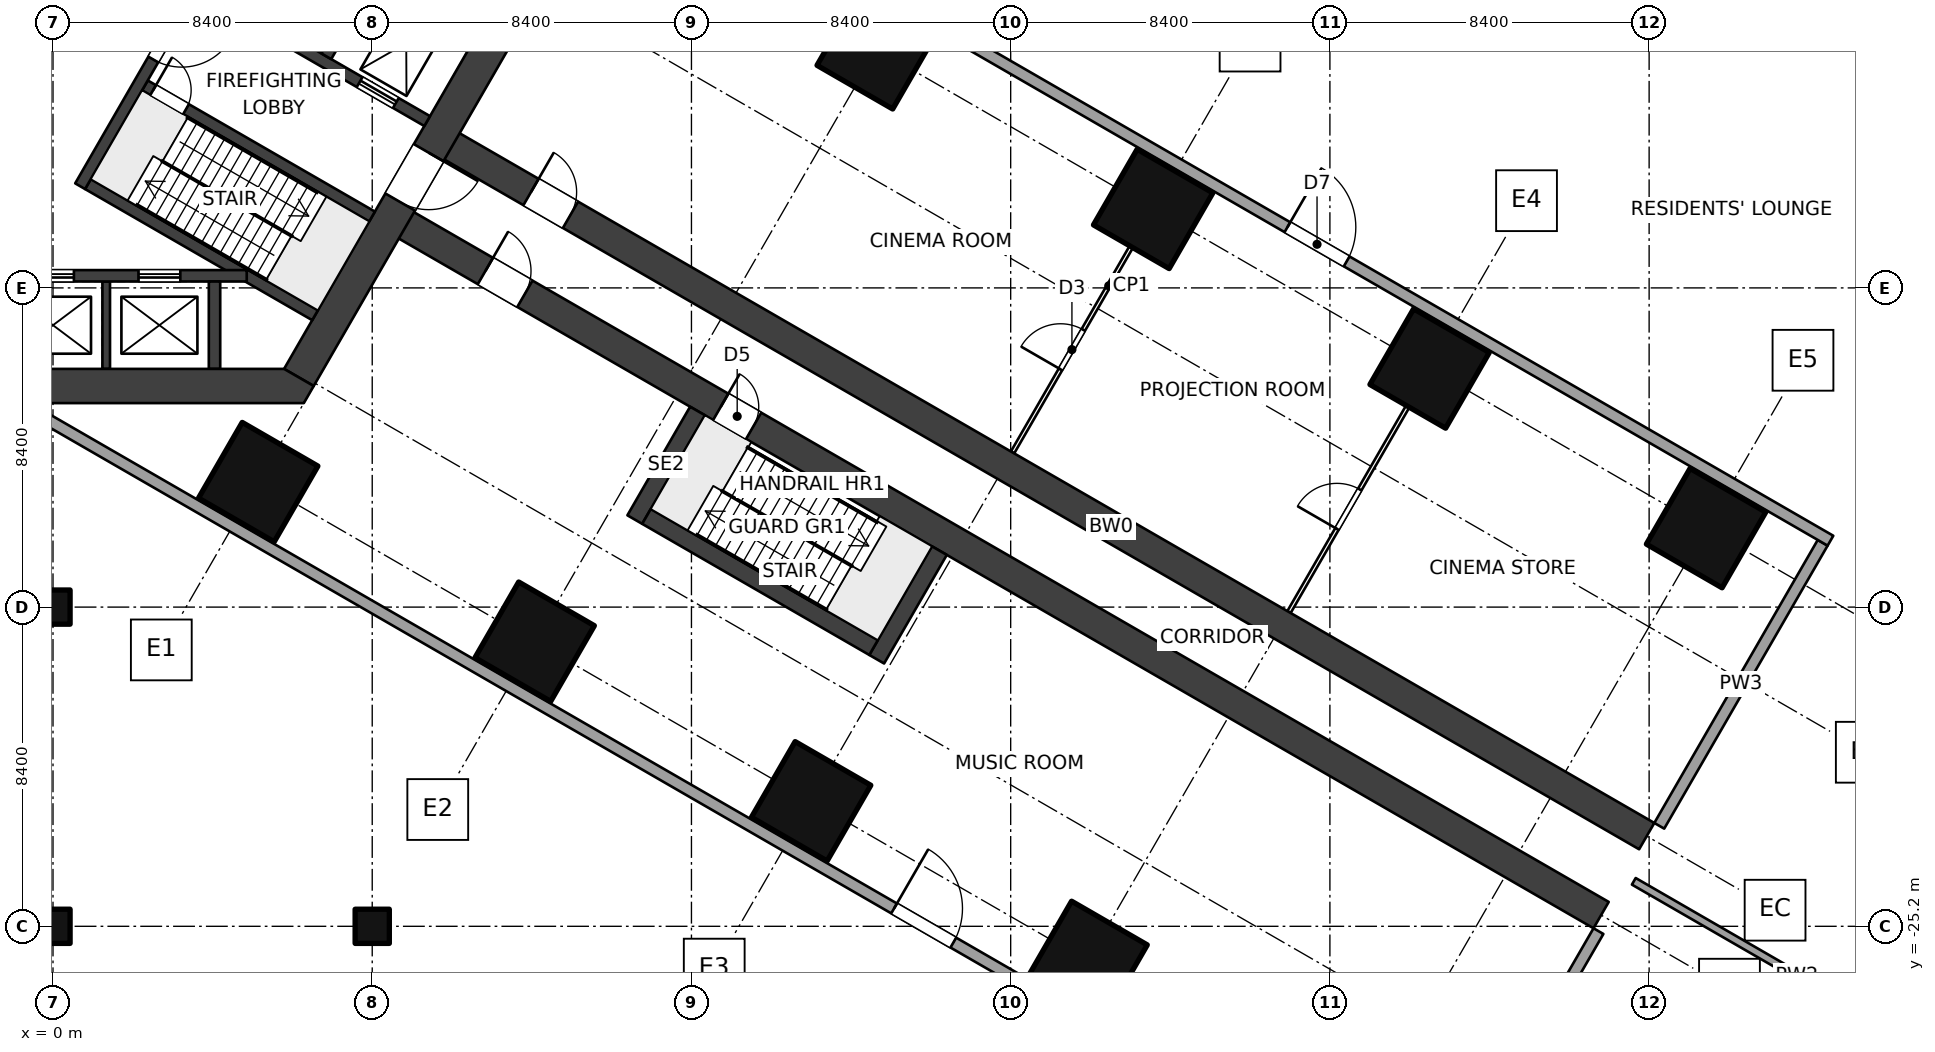
"""IFC4 building model, lengths in metres.
Left out: names, types, materials, properties, quantities, classifications, styles, units other than length and angle.
Written with IfcOpenShell. Run it as: python <this file> out.ifc"""

import sys

from ifc_helpers import new_model, si_unit, direction, frame, frame_2d, origin, origin_2d, place, context, subcontext, project, spatial, polyline, rectangle, outline, extrude, element, fill, save


model = new_model("IFC4")
c1 = context("Model", 3, precision=1e-05, world=origin(), true_north=direction((0.0, 1.0)))
c2 = subcontext(c1, "Body", "Model", "MODEL_VIEW")
j1 = project(units=[si_unit("LENGTHUNIT", "METRE"), si_unit("PLANEANGLEUNIT", "RADIAN")], contexts=[c1])
p1 = place(None, origin())
s1 = spatial("IfcSite", under=j1, at=p1, CompositionType="ELEMENT")
p2 = place(p1, origin())
s2 = spatial("IfcBuilding", under=s1, at=p2, CompositionType="ELEMENT")
p3 = place(p2, frame((0.0, 0.0, 6.0)))
s3 = spatial("IfcBuildingStorey", under=s2, at=p3, CompositionType="ELEMENT", Elevation=6.0)
for number, where, z_axis, x_axis in (
    (1, (5.4, -13.51, 0.0), (0.0, 0.0, 1.0), (-0.5, -0.866, 0.0)),
    (2, (21.675, -2.122, 0.0), (0.0, 0.0, 1.0), (-0.5, -0.866, 0.0)),
    (3, (12.675, -17.71, 0.0), (0.0, 0.0, 1.0), (-0.5, -0.866, 0.0)),
    (4, (28.949, -6.322, 0.0), (0.0, 0.0, 1.0), (-0.5, -0.866, 0.0)),
    (5, (19.949, -21.91, 0.0), (0.0, 0.0, 1.0), (-0.5, -0.866, 0.0)),
    (6, (36.224, -10.521, 0.0), (0.0, 0.0, 1.0), (-0.5, -0.866, 0.0)),
    (7, (27.224, -26.11, 0.0), (0.0, 0.0, 1.0), (-0.5, -0.866, 0.0)),
    (8, (43.499, -14.721, 0.0), (0.0, 0.0, 1.0), (-0.5, -0.866, 0.0)),
):
    element("IfcColumn", number, at=place(p3, frame(where, z_axis=z_axis, x_axis=x_axis)), inside=s3, PredefinedType="COLUMN", context=c2, shape_type="SweptSolid", body=[
        extrude(rectangle(XDim=2.3, YDim=2.3, at=origin_2d()), origin(), (0.0, 0.0, 1.0), 5.0),
    ])
for number, where, z_axis, x_axis in (
    (9, (0.0, -25.2, 0.0), (0.0, 0.0, 1.0), (1.0, 0.0, 0.0)),
    (10, (0.0, -16.8, 0.0), (0.0, 0.0, 1.0), (1.0, 0.0, 0.0)),
    (11, (8.4, -25.2, 0.0), (0.0, 0.0, 1.0), (1.0, 0.0, 0.0)),
):
    element("IfcColumn", number, at=place(p3, frame(where, z_axis=z_axis, x_axis=x_axis)), inside=s3, PredefinedType="COLUMN", context=c2, shape_type="SweptSolid", body=[
        extrude(rectangle(XDim=0.9, YDim=0.9, at=origin_2d()), origin(), (0.0, 0.0, 1.0), 5.0),
    ])
p4 = place(p3, frame((12.551, -0.225, 0.0), z_axis=(0.0, 0.0, 1.0), x_axis=(-0.499997612506, -0.8660267822, 0.0)))
e12 = element("IfcWall", 12, at=p4, inside=s3, PredefinedType="SHEAR", context=c2, shape_type="SweptSolid", body=[
    extrude(rectangle(XDim=12.161, YDim=0.9, at=frame_2d((6.08, 0.0))), origin(), (0.0, 0.0, 1.0), 5.0),
])
p5 = place(p4, frame((5.33, 0.0, 0.0)))
e13 = element("IfcOpeningElement", 13, at=p5, cuts=e12, PredefinedType="OPENING", context=c2, shape_type="SweptSolid", body=[
    extrude(rectangle(XDim=1.5, YDim=2.1, at=frame_2d((0.75, 1.05))), frame((0.0, 0.46, 0.0), z_axis=(0.0, -1.0, 0.0), x_axis=(1.0, 0.0, 0.0)), (0.0, 0.0, 1.0), 0.92),
])
p6 = place(p3, origin())
e14 = element("IfcWall", 14, at=p6, inside=s3, PredefinedType="SHEAR", context=c2, shape_type="SweptSolid", body=[
    extrude(outline(polyline([(-6.6, -11.432), (6.6, -11.432), (6.86, -10.981), (6.08, -10.531), (-6.08, -10.531), (-6.86, -10.981), (-6.6, -11.432)])), origin(), (0.0, 0.0, 1.0), 5.0),
])
p7 = place(p3, frame((5.314, 2.244, 0.0), z_axis=(0.0, 0.0, 1.0), x_axis=(-0.499995050369, -0.866028261437, 0.0)))
e15 = element("IfcWall", 15, at=p7, inside=s3, PredefinedType="SHEAR", context=c2, shape_type="SweptSolid", body=[
    extrude(rectangle(XDim=9.2, YDim=0.3, at=frame_2d((4.6, 0.0))), origin(), (0.0, 0.0, 1.0), 5.0),
])
p8 = place(p7, frame((3.85, 0.0, 0.0)))
e16 = element("IfcOpeningElement", 16, at=p8, cuts=e15, PredefinedType="OPENING", context=c2, shape_type="SweptSolid", body=[
    extrude(rectangle(XDim=1.5, YDim=2.1, at=frame_2d((0.75, 1.05))), frame((0.0, 0.16, 0.0), z_axis=(0.0, -1.0, 0.0), x_axis=(1.0, 0.0, 0.0)), (0.0, 0.0, 1.0), 0.32),
])
p9 = place(p7, frame((1.95, 0.0, 0.0)))
e17 = element("IfcOpeningElement", 17, at=p9, cuts=e15, PredefinedType="OPENING", context=c2, shape_type="SweptSolid", body=[
    extrude(rectangle(XDim=0.9, YDim=2.1, at=frame_2d((0.45, 1.05))), frame((0.0, 0.16, 0.0), z_axis=(0.0, -1.0, 0.0), x_axis=(1.0, 0.0, 0.0)), (0.0, 0.0, 1.0), 0.32),
])
p10 = place(p3, frame((2.419, -3.071, 0.0), z_axis=(0.0, 0.0, 1.0), x_axis=(0.86602711848, -0.499997030048, 0.0)))
e18 = element("IfcWall", 18, at=p10, inside=s3, PredefinedType="SHEAR", context=c2, shape_type="SweptSolid", body=[
    extrude(rectangle(XDim=6.901, YDim=0.3, at=frame_2d((3.451, 0.0))), origin(), (0.0, 0.0, 1.0), 5.0),
])
p11 = place(p10, frame((0.25, 0.0, 0.0)))
e19 = element("IfcOpeningElement", 19, at=p11, cuts=e18, PredefinedType="OPENING", context=c2, shape_type="SweptSolid", body=[
    extrude(rectangle(XDim=1.0, YDim=2.1, at=frame_2d((0.5, 1.05))), frame((0.0, 0.16, 0.0), z_axis=(0.0, -1.0, 0.0), x_axis=(1.0, 0.0, 0.0)), (0.0, 0.0, 1.0), 0.32),
])
p12 = place(p3, frame((0.919, -5.669, 0.0), z_axis=(0.0, 0.0, 1.0), x_axis=(0.866011800373, -0.500023561059, 0.0)))
e20 = element("IfcWall", 20, at=p12, inside=s3, PredefinedType="SHEAR", context=c2, shape_type="SweptSolid", body=[
    extrude(rectangle(XDim=6.902, YDim=0.3, at=frame_2d((3.451, 0.0))), origin(), (0.0, 0.0, 1.0), 5.0),
])
p13 = place(p3, frame((3.869, -0.559, 0.0), z_axis=(0.0, 0.0, 1.0), x_axis=(0.86602711848, -0.499997030048, 0.0)))
e21 = element("IfcWall", 21, at=p13, inside=s3, PredefinedType="SHEAR", context=c2, shape_type="SweptSolid", body=[
    extrude(rectangle(XDim=6.901, YDim=0.3, at=frame_2d((3.451, 0.0))), origin(), (0.0, 0.0, 1.0), 5.0),
])
p14 = place(p13, frame((4.85, 0.0, 0.0)))
e22 = element("IfcOpeningElement", 22, at=p14, cuts=e21, PredefinedType="OPENING", context=c2, shape_type="SweptSolid", body=[
    extrude(rectangle(XDim=1.1, YDim=2.1, at=frame_2d((0.55, 1.05))), frame((0.0, 0.16, 0.0), z_axis=(0.0, -1.0, 0.0), x_axis=(1.0, 0.0, 0.0)), (0.0, 0.0, 1.0), 0.32),
])
p15 = place(p3, frame((8.541, 0.034, 0.0), z_axis=(0.0, 0.0, 1.0), x_axis=(-0.50000943426, -0.866019956843, 0.0)))
e23 = element("IfcWall", 23, at=p15, inside=s3, PredefinedType="SHEAR", context=c2, shape_type="SweptSolid", body=[
    extrude(rectangle(XDim=2.7, YDim=0.3, at=frame_2d((1.35, 0.0))), origin(), (0.0, 0.0, 1.0), 5.0),
])
p16 = place(p3, frame((5.098, -8.082, 0.0), z_axis=(0.0, 0.0, 1.0), x_axis=(-1.0, 0.0, 0.0)))
e24 = element("IfcWall", 24, at=p16, inside=s3, PredefinedType="SHEAR", context=c2, shape_type="SweptSolid", body=[
    extrude(rectangle(XDim=10.195, YDim=0.3, at=frame_2d((5.098, 0.0))), origin(), (0.0, 0.0, 1.0), 5.0),
])
p17 = place(p16, frame((1.748, 0.0, 0.0)))
e25 = element("IfcOpeningElement", 25, at=p17, cuts=e24, PredefinedType="OPENING", context=c2, shape_type="SweptSolid", body=[
    extrude(rectangle(XDim=1.1, YDim=2.1, at=frame_2d((0.55, 1.05))), frame((0.0, 0.16, 0.0), z_axis=(0.0, -1.0, 0.0), x_axis=(1.0, 0.0, 0.0)), (0.0, 0.0, 1.0), 0.32),
])
p18 = place(p16, frame((4.548, 0.0, 0.0)))
e26 = element("IfcOpeningElement", 26, at=p18, cuts=e24, PredefinedType="OPENING", context=c2, shape_type="SweptSolid", body=[
    extrude(rectangle(XDim=1.1, YDim=2.1, at=frame_2d((0.55, 1.05))), frame((0.0, 0.16, 0.0), z_axis=(0.0, -1.0, 0.0), x_axis=(1.0, 0.0, 0.0)), (0.0, 0.0, 1.0), 0.32),
])
p19 = place(p16, frame((7.348, 0.0, 0.0)))
e27 = element("IfcOpeningElement", 27, at=p19, cuts=e24, PredefinedType="OPENING", context=c2, shape_type="SweptSolid", body=[
    extrude(rectangle(XDim=1.1, YDim=2.1, at=frame_2d((0.55, 1.05))), frame((0.0, 0.16, 0.0), z_axis=(0.0, -1.0, 0.0), x_axis=(1.0, 0.0, 0.0)), (0.0, 0.0, 1.0), 0.32),
])
p20 = place(p3, frame((4.25, -8.231, 0.0), z_axis=(0.0, 0.0, 1.0), x_axis=(0.0, -1.0, 0.0)))
e28 = element("IfcWall", 28, at=p20, inside=s3, PredefinedType="SHEAR", context=c2, shape_type="SweptSolid", body=[
    extrude(rectangle(XDim=2.3, YDim=0.3, at=frame_2d((1.15, 0.0))), origin(), (0.0, 0.0, 1.0), 5.0),
])
p21 = place(p3, frame((1.4, -8.231, 0.0), z_axis=(0.0, 0.0, 1.0), x_axis=(0.0, -1.0, 0.0)))
e29 = element("IfcWall", 29, at=p21, inside=s3, PredefinedType="SHEAR", context=c2, shape_type="SweptSolid", body=[
    extrude(rectangle(XDim=2.3, YDim=0.2, at=frame_2d((1.15, 0.0))), origin(), (0.0, 0.0, 1.0), 5.0),
])
p22 = place(p3, frame((10.11, -4.451, 0.0), z_axis=(0.0, 0.0, 1.0), x_axis=(0.866025284237, -0.500000207062, 0.0)))
e30 = element("IfcWall", 30, at=p22, inside=s3, PredefinedType="SHEAR", context=c2, shape_type="SweptSolid", body=[
    extrude(rectangle(XDim=36.75, YDim=0.8, at=frame_2d((18.375, 0.0))), origin(), (0.0, 0.0, 1.0), 5.0),
])
p23 = place(p22, frame((2.85, 0.0, 0.0)))
e31 = element("IfcOpeningElement", 31, at=p23, cuts=e30, PredefinedType="OPENING", context=c2, shape_type="SweptSolid", body=[
    extrude(rectangle(XDim=1.2, YDim=2.1, at=frame_2d((0.6, 1.05))), frame((0.0, 0.41, 0.0), z_axis=(0.0, -1.0, 0.0), x_axis=(1.0, 0.0, 0.0)), (0.0, 0.0, 1.0), 0.82),
])
p24 = place(p3, frame((8.91, -6.53, 0.0), z_axis=(0.0, 0.0, 1.0), x_axis=(0.866025284237, -0.500000207062, 0.0)))
e32 = element("IfcWall", 32, at=p24, inside=s3, PredefinedType="SHEAR", context=c2, shape_type="SweptSolid", body=[
    extrude(rectangle(XDim=36.75, YDim=0.8, at=frame_2d((18.375, 0.0))), origin(), (0.0, 0.0, 1.0), 5.0),
])
p25 = place(p24, frame((10.0, 0.0, 0.0)))
e33 = element("IfcOpeningElement", 33, at=p25, cuts=e32, PredefinedType="OPENING", context=c2, shape_type="SweptSolid", body=[
    extrude(rectangle(XDim=1.0, YDim=2.1, at=frame_2d((0.5, 1.05))), frame((0.0, 0.41, 0.0), z_axis=(0.0, -1.0, 0.0), x_axis=(1.0, 0.0, 0.0)), (0.0, 0.0, 1.0), 0.82),
])
p26 = place(p24, frame((2.85, 0.0, 0.0)))
e34 = element("IfcOpeningElement", 34, at=p26, cuts=e32, PredefinedType="OPENING", context=c2, shape_type="SweptSolid", body=[
    extrude(rectangle(XDim=1.2, YDim=2.1, at=frame_2d((0.6, 1.05))), frame((0.0, 0.41, 0.0), z_axis=(0.0, -1.0, 0.0), x_axis=(1.0, 0.0, 0.0)), (0.0, 0.0, 1.0), 0.82),
])
p27 = place(p3, frame((25.249, -12.73, 0.0), z_axis=(0.0, 0.0, 1.0), x_axis=(0.499987320047, 0.866032724435, 0.0)))
e35 = element("IfcWall", 35, at=p27, inside=s3, PredefinedType="PARTITIONING", context=c2, shape_type="SweptSolid", body=[
    extrude(rectangle(XDim=6.25, YDim=0.1, at=frame_2d((3.125, 0.0))), origin(), (0.0, 0.0, 1.0), 2.9),
])
p28 = place(p27, frame((2.525, 0.0, 0.0)))
e36 = element("IfcOpeningElement", 36, at=p28, cuts=e35, PredefinedType="OPENING", context=c2, shape_type="SweptSolid", body=[
    extrude(rectangle(XDim=1.2, YDim=2.1, at=frame_2d((0.6, 1.05))), frame((0.0, 0.06, 0.0), z_axis=(0.0, -1.0, 0.0), x_axis=(1.0, 0.0, 0.0)), (0.0, 0.0, 1.0), 0.12),
])
p29 = place(p3, frame((32.524, -16.93, 0.0), z_axis=(0.0, 0.0, 1.0), x_axis=(0.500004234368, 0.866022959057, 0.0)))
e37 = element("IfcWall", 37, at=p29, inside=s3, PredefinedType="PARTITIONING", context=c2, shape_type="SweptSolid", body=[
    extrude(rectangle(XDim=6.25, YDim=0.1, at=frame_2d((3.125, 0.0))), origin(), (0.0, 0.0, 1.0), 2.9),
])
p30 = place(p29, frame((2.525, 0.0, 0.0)))
e38 = element("IfcOpeningElement", 38, at=p30, cuts=e37, PredefinedType="OPENING", context=c2, shape_type="SweptSolid", body=[
    extrude(rectangle(XDim=1.2, YDim=2.1, at=frame_2d((0.6, 1.05))), frame((0.0, 0.06, 0.0), z_axis=(0.0, -1.0, 0.0), x_axis=(1.0, 0.0, 0.0)), (0.0, 0.0, 1.0), 0.12),
])
p31 = place(p3, frame((41.596, -24.016, 0.0), z_axis=(0.0, 0.0, 1.0), x_axis=(0.866027790195, -0.499995866593, 0.0)))
e39 = element("IfcWall", 39, at=p31, inside=s3, PredefinedType="SOLIDWALL", context=c2, shape_type="SweptSolid", body=[
    extrude(rectangle(XDim=9.919, YDim=0.2, at=frame_2d((4.96, 0.0))), origin(), (0.0, 0.0, 1.0), 4.7),
])
for number, where, z_axis, x_axis in (
    (40, (42.267, -22.555, 0.0), (0.0, 0.0, 1.0), (0.5, 0.866, 0.0)),
    (41, (40.667, -25.326, 0.0), (0.0, 0.0, 1.0), (-0.5, -0.866, 0.0)),
):
    element("IfcWall", number, at=place(p3, frame(where, z_axis=z_axis, x_axis=x_axis)), inside=s3, PredefinedType="SOLIDWALL", context=c2, shape_type="SweptSolid", body=[
        extrude(rectangle(XDim=8.6, YDim=0.3, at=frame_2d((4.3, 0.0))), origin(), (0.0, 0.0, 1.0), 3.1),
    ])
p32 = place(p3, frame((9.45, 6.495, 0.0), z_axis=(0.0, 0.0, 1.0), x_axis=(0.866025301493, -0.500000177174, 0.0)))
e42 = element("IfcWall", 42, at=p32, inside=s3, PredefinedType="SOLIDWALL", context=c2, shape_type="SweptSolid", body=[
    extrude(rectangle(XDim=43.095, YDim=0.3, at=frame_2d((21.548, 0.0))), origin(), (0.0, 0.0, 1.0), 4.7),
])
p33 = place(p32, frame((26.595, 0.0, 0.0)))
e43 = element("IfcOpeningElement", 43, at=p33, cuts=e42, PredefinedType="OPENING", context=c2, shape_type="SweptSolid", body=[
    extrude(rectangle(XDim=1.8, YDim=2.4, at=frame_2d((0.9, 1.2))), frame((0.0, 0.16, 0.0), z_axis=(0.0, -1.0, 0.0), x_axis=(1.0, 0.0, 0.0)), (0.0, 0.0, 1.0), 0.32),
])
p34 = place(p3, frame((-0.9, -11.432, 0.0), z_axis=(0.0, 0.0, 1.0), x_axis=(0.866025301493, -0.500000177174, 0.0)))
e44 = element("IfcWall", 44, at=p34, inside=s3, PredefinedType="SOLIDWALL", context=c2, shape_type="SweptSolid", body=[
    extrude(rectangle(XDim=43.095, YDim=0.3, at=frame_2d((21.548, 0.0))), origin(), (0.0, 0.0, 1.0), 4.7),
])
p35 = place(p34, frame((26.595, 0.0, 0.0)))
e45 = element("IfcOpeningElement", 45, at=p35, cuts=e44, PredefinedType="OPENING", context=c2, shape_type="SweptSolid", body=[
    extrude(rectangle(XDim=1.8, YDim=2.4, at=frame_2d((0.9, 1.2))), frame((0.0, 0.16, 0.0), z_axis=(0.0, -1.0, 0.0), x_axis=(1.0, 0.0, 0.0)), (0.0, 0.0, 1.0), 0.32),
])
for number, where, z_axis, x_axis in (
    (46, (16.959, -11.639, 0.0), (0.0, 0.0, 1.0), (-0.5, -0.866, 0.0)),
    (47, (23.324, -15.314, 0.0), (0.0, 0.0, 1.0), (-0.5, -0.866, 0.0)),
):
    element("IfcWall", number, at=place(p3, frame(where, z_axis=z_axis, x_axis=x_axis)), inside=s3, PredefinedType="SOLIDWALL", context=c2, shape_type="SweptSolid", body=[
        extrude(rectangle(XDim=3.3, YDim=0.45, at=frame_2d((1.65, 0.0))), origin(), (0.0, 0.0, 1.0), 5.0),
    ])
p36 = place(p3, frame((15.616, -14.415, 0.0), z_axis=(0.0, 0.0, 1.0), x_axis=(0.866028853923, -0.499994024137, 0.0)))
e48 = element("IfcWall", 48, at=p36, inside=s3, PredefinedType="SOLIDWALL", context=c2, shape_type="SweptSolid", body=[
    extrude(rectangle(XDim=6.9, YDim=0.45, at=frame_2d((3.45, 0.0))), origin(), (0.0, 0.0, 1.0), 5.0),
])
p37 = place(p17, origin())
e49 = element("IfcDoor", 49, at=p37, inside=s3, OperationType="DOUBLE_DOOR_SLIDING", PredefinedType="DOOR", context=c2, shape_type="SweptSolid", body=[
    extrude(rectangle(XDim=1.1, YDim=2.1, at=frame_2d((0.55, 1.05))), frame((0.0, 0.025, 0.0), z_axis=(0.0, -1.0, 0.0), x_axis=(1.0, 0.0, 0.0)), (0.0, 0.0, 1.0), 0.05),
])
fill(e25, e49)
p38 = place(p18, origin())
e50 = element("IfcDoor", 50, at=p38, inside=s3, OperationType="DOUBLE_DOOR_SLIDING", PredefinedType="DOOR", context=c2, shape_type="SweptSolid", body=[
    extrude(rectangle(XDim=1.1, YDim=2.1, at=frame_2d((0.55, 1.05))), frame((0.0, 0.025, 0.0), z_axis=(0.0, -1.0, 0.0), x_axis=(1.0, 0.0, 0.0)), (0.0, 0.0, 1.0), 0.05),
])
fill(e26, e50)
p39 = place(p14, origin())
e51 = element("IfcDoor", 51, at=p39, inside=s3, OperationType="DOUBLE_DOOR_SLIDING", PredefinedType="DOOR", context=c2, shape_type="SweptSolid", body=[
    extrude(rectangle(XDim=1.1, YDim=2.1, at=frame_2d((0.55, 1.05))), frame((0.0, 0.025, 0.0), z_axis=(0.0, -1.0, 0.0), x_axis=(1.0, 0.0, 0.0)), (0.0, 0.0, 1.0), 0.05),
])
fill(e22, e51)
p40 = place(p8, origin())
e52 = element("IfcDoor", 52, at=p40, inside=s3, OperationType="DOUBLE_DOOR_DOUBLE_SWING", PredefinedType="DOOR", context=c2, shape_type="SweptSolid", body=[
    extrude(rectangle(XDim=1.5, YDim=2.1, at=frame_2d((0.75, 1.05))), frame((0.0, 0.025, 0.0), z_axis=(0.0, -1.0, 0.0), x_axis=(1.0, 0.0, 0.0)), (0.0, 0.0, 1.0), 0.05),
])
fill(e16, e52)
p41 = place(p11, origin())
e53 = element("IfcDoor", 53, at=p41, inside=s3, OperationType="SINGLE_SWING_LEFT", PredefinedType="DOOR", context=c2, shape_type="SweptSolid", body=[
    extrude(rectangle(XDim=1.0, YDim=2.1, at=frame_2d((0.5, 1.05))), frame((0.0, 0.025, 0.0), z_axis=(0.0, -1.0, 0.0), x_axis=(1.0, 0.0, 0.0)), (0.0, 0.0, 1.0), 0.05),
])
fill(e19, e53)
p42 = place(p5, origin())
e54 = element("IfcDoor", 54, at=p42, inside=s3, OperationType="DOUBLE_DOOR_DOUBLE_SWING", PredefinedType="DOOR", context=c2, shape_type="SweptSolid", body=[
    extrude(rectangle(XDim=1.5, YDim=2.1, at=frame_2d((0.75, 1.05))), frame((0.0, 0.025, 0.0), z_axis=(0.0, -1.0, 0.0), x_axis=(1.0, 0.0, 0.0)), (0.0, 0.0, 1.0), 0.05),
])
fill(e13, e54)
p43 = place(p25, origin())
e55 = element("IfcDoor", 55, at=p43, inside=s3, OperationType="SINGLE_SWING_LEFT", PredefinedType="DOOR", context=c2, shape_type="SweptSolid", body=[
    extrude(rectangle(XDim=1.0, YDim=2.1, at=frame_2d((0.5, 1.05))), frame((0.0, 0.025, 0.0), z_axis=(0.0, -1.0, 0.0), x_axis=(1.0, 0.0, 0.0)), (0.0, 0.0, 1.0), 0.05),
])
fill(e33, e55)
p44 = place(p28, origin())
e56 = element("IfcDoor", 56, at=p44, inside=s3, OperationType="DOUBLE_SWING_LEFT", PredefinedType="DOOR", context=c2, shape_type="SweptSolid", body=[
    extrude(rectangle(XDim=1.2, YDim=2.1, at=frame_2d((0.6, 1.05))), frame((0.0, 0.025, 0.0), z_axis=(0.0, -1.0, 0.0), x_axis=(1.0, 0.0, 0.0)), (0.0, 0.0, 1.0), 0.05),
])
fill(e36, e56)
p45 = place(p30, origin())
e57 = element("IfcDoor", 57, at=p45, inside=s3, OperationType="DOUBLE_SWING_LEFT", PredefinedType="DOOR", context=c2, shape_type="SweptSolid", body=[
    extrude(rectangle(XDim=1.2, YDim=2.1, at=frame_2d((0.6, 1.05))), frame((0.0, 0.025, 0.0), z_axis=(0.0, -1.0, 0.0), x_axis=(1.0, 0.0, 0.0)), (0.0, 0.0, 1.0), 0.05),
])
fill(e38, e57)
p46 = place(p23, origin())
e58 = element("IfcDoor", 58, at=p46, inside=s3, OperationType="DOUBLE_SWING_LEFT", PredefinedType="DOOR", context=c2, shape_type="SweptSolid", body=[
    extrude(rectangle(XDim=1.2, YDim=2.1, at=frame_2d((0.6, 1.05))), frame((0.0, 0.025, 0.0), z_axis=(0.0, -1.0, 0.0), x_axis=(1.0, 0.0, 0.0)), (0.0, 0.0, 1.0), 0.05),
])
fill(e31, e58)
p47 = place(p26, origin())
e59 = element("IfcDoor", 59, at=p47, inside=s3, OperationType="DOUBLE_SWING_LEFT", PredefinedType="DOOR", context=c2, shape_type="SweptSolid", body=[
    extrude(rectangle(XDim=1.2, YDim=2.1, at=frame_2d((0.6, 1.05))), frame((0.0, 0.025, 0.0), z_axis=(0.0, -1.0, 0.0), x_axis=(1.0, 0.0, 0.0)), (0.0, 0.0, 1.0), 0.05),
])
fill(e34, e59)
p48 = place(p33, origin())
e60 = element("IfcDoor", 60, at=p48, inside=s3, OperationType="DOUBLE_DOOR_DOUBLE_SWING", PredefinedType="DOOR", context=c2, shape_type="SweptSolid", body=[
    extrude(rectangle(XDim=1.8, YDim=2.4, at=frame_2d((0.9, 1.2))), frame((0.0, 0.025, 0.0), z_axis=(0.0, -1.0, 0.0), x_axis=(1.0, 0.0, 0.0)), (0.0, 0.0, 1.0), 0.05),
])
fill(e43, e60)
p49 = place(p35, origin())
e61 = element("IfcDoor", 61, at=p49, inside=s3, OperationType="DOUBLE_DOOR_DOUBLE_SWING", PredefinedType="DOOR", context=c2, shape_type="SweptSolid", body=[
    extrude(rectangle(XDim=1.8, YDim=2.4, at=frame_2d((0.9, 1.2))), frame((0.0, 0.025, 0.0), z_axis=(0.0, -1.0, 0.0), x_axis=(1.0, 0.0, 0.0)), (0.0, 0.0, 1.0), 0.05),
])
fill(e45, e61)
save(model, sys.argv[1])
